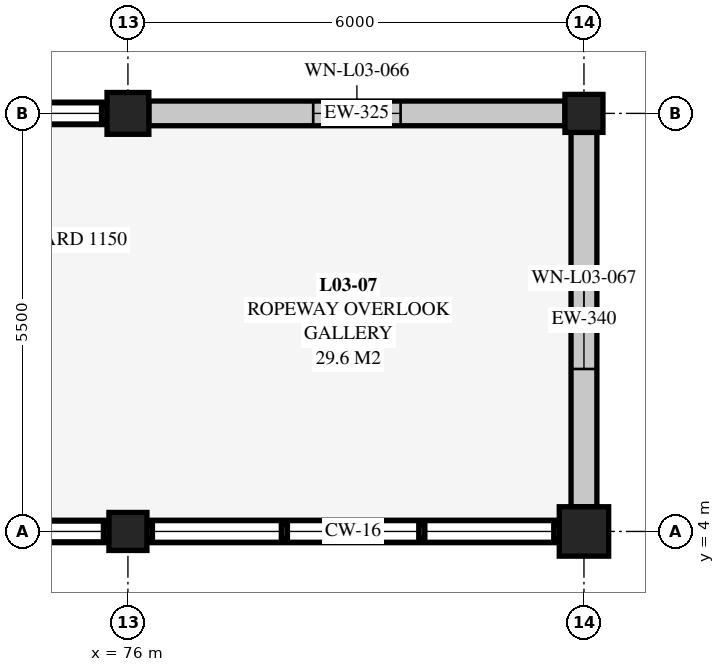
"""IFC4 building model, lengths in metres.
Left out: names, types, materials, properties, quantities, classifications, styles, units other than length and angle.
Written with IfcOpenShell. Run it as: python <this file> out.ifc"""

import sys

from ifc_helpers import new_model, si_unit, direction, frame, frame_2d, origin, origin_2d, place, context, subcontext, project, spatial, rectangle, extrude, element, fill, save


model = new_model("IFC4")
c1 = context("Model", 3, precision=1e-05, world=origin(), true_north=direction((0.0, 1.0)))
c2 = subcontext(c1, "Body", "Model", "MODEL_VIEW")
j1 = project(units=[si_unit("LENGTHUNIT", "METRE"), si_unit("PLANEANGLEUNIT", "RADIAN")], contexts=[c1])
p1 = place(None, origin())
s1 = spatial("IfcSite", under=j1, at=p1, CompositionType="ELEMENT")
p2 = place(p1, origin())
s2 = spatial("IfcBuilding", under=s1, at=p2, CompositionType="ELEMENT")
p3 = place(p2, frame((0.0, 0.0, 9.0)))
s3 = spatial("IfcBuildingStorey", under=s2, at=p3, CompositionType="ELEMENT", Elevation=9.0)
p4 = place(p3, frame((76.0, 4.0, 0.0), z_axis=(0.0, 0.0, 1.0), x_axis=(1.0, 0.0, 0.0)))
e1 = element("IfcColumn", 1, at=p4, inside=s3, PredefinedType="COLUMN", context=c2, shape_type="SweptSolid", body=[
    extrude(rectangle(XDim=0.5, YDim=0.5, at=origin_2d()), origin(), (0.0, 0.0, 1.0), 4.5),
])
p5 = place(p3, frame((76.0, 9.5, 0.0), z_axis=(0.0, 0.0, 1.0), x_axis=(1.0, 0.0, 0.0)))
e2 = element("IfcColumn", 2, at=p5, inside=s3, PredefinedType="COLUMN", context=c2, shape_type="SweptSolid", body=[
    extrude(rectangle(XDim=0.55, YDim=0.55, at=origin_2d()), origin(), (0.0, 0.0, 1.0), 4.5),
])
p6 = place(p3, frame((82.0, 4.0, 0.0), z_axis=(0.0, 0.0, 1.0), x_axis=(1.0, 0.0, 0.0)))
e3 = element("IfcColumn", 3, at=p6, inside=s3, PredefinedType="COLUMN", context=c2, shape_type="SweptSolid", body=[
    extrude(rectangle(XDim=0.65, YDim=0.65, at=origin_2d()), origin(), (0.0, 0.0, 1.0), 4.5),
])
p7 = place(p3, frame((82.0, 9.5, 0.0), z_axis=(0.0, 0.0, 1.0), x_axis=(1.0, 0.0, 0.0)))
e4 = element("IfcColumn", 4, at=p7, inside=s3, PredefinedType="COLUMN", context=c2, shape_type="SweptSolid", body=[
    extrude(rectangle(XDim=0.5, YDim=0.5, at=origin_2d()), origin(), (0.0, 0.0, 1.0), 4.5),
])
p8 = place(p3, frame((75.75, 4.0, 0.0), z_axis=(0.0, 0.0, 1.0), x_axis=(-1.0, 0.0, 0.0)))
e5 = element("IfcWall", 5, at=p8, inside=s3, PredefinedType="SOLIDWALL", context=c2, shape_type="SweptSolid", body=[
    extrude(rectangle(XDim=5.45, YDim=0.295, at=frame_2d((2.725, 0.0))), origin(), (0.0, 0.0, 1.0), 0.41),
])
p9 = place(p3, frame((70.325, 9.5, 0.0), z_axis=(0.0, 0.0, 1.0), x_axis=(1.0, 0.0, 0.0)))
e6 = element("IfcWall", 6, at=p9, inside=s3, PredefinedType="SOLIDWALL", context=c2, shape_type="SweptSolid", body=[
    extrude(rectangle(XDim=5.4, YDim=0.295, at=frame_2d((2.7, 0.0))), origin(), (0.0, 0.0, 1.0), 0.46),
])
p10 = place(p3, frame((81.675, 4.0, 0.0), z_axis=(0.0, 0.0, 1.0), x_axis=(-1.0, 0.0, 0.0)))
e7 = element("IfcWall", 7, at=p10, inside=s3, PredefinedType="SOLIDWALL", context=c2, shape_type="SweptSolid", body=[
    extrude(rectangle(XDim=5.425, YDim=0.295, at=frame_2d((2.712, 0.0))), origin(), (0.0, 0.0, 1.0), 0.52),
])
p11 = place(p3, frame((76.275, 9.5, 0.0), z_axis=(0.0, 0.0, 1.0), x_axis=(1.0, 0.0, 0.0)))
e8 = element("IfcWall", 8, at=p11, inside=s3, PredefinedType="SOLIDWALL", context=c2, shape_type="SweptSolid", body=[
    extrude(rectangle(XDim=5.475, YDim=0.325, at=frame_2d((2.738, 0.0))), origin(), (0.0, 0.0, 1.0), 4.093),
])
p12 = place(p11, frame((2.163, 0.0, 1.35)))
e9 = element("IfcOpeningElement", 9, at=p12, cuts=e8, PredefinedType="OPENING", context=c2, shape_type="SweptSolid", body=[
    extrude(rectangle(XDim=1.15, YDim=1.35, at=frame_2d((0.575, 0.675))), frame((0.0, 0.173, 0.0), z_axis=(0.0, -1.0, 0.0), x_axis=(1.0, 0.0, 0.0)), (0.0, 0.0, 1.0), 0.345),
])
p13 = place(p3, frame((82.0, 9.25, 0.0), z_axis=(0.0, 0.0, 1.0), x_axis=(0.0, -1.0, 0.0)))
e10 = element("IfcWall", 10, at=p13, inside=s3, PredefinedType="SOLIDWALL", context=c2, shape_type="SweptSolid", body=[
    extrude(rectangle(XDim=4.925, YDim=0.34, at=frame_2d((2.462, 0.0))), origin(), (0.0, 0.0, 1.0), 4.093),
])
p14 = place(p13, frame((1.812, 0.0, 1.3)))
e11 = element("IfcOpeningElement", 11, at=p14, cuts=e10, PredefinedType="OPENING", context=c2, shape_type="SweptSolid", body=[
    extrude(rectangle(XDim=1.3, YDim=1.45, at=frame_2d((0.65, 0.725))), frame((0.0, 0.18, 0.0), z_axis=(0.0, -1.0, 0.0), x_axis=(1.0, 0.0, 0.0)), (0.0, 0.0, 1.0), 0.36),
])
p15 = place(p12, origin())
e12 = element("IfcWindow", 12, at=p15, inside=s3, PartitioningType="SINGLE_PANEL", PredefinedType="WINDOW", context=c2, shape_type="SweptSolid", body=[
    extrude(rectangle(XDim=1.15, YDim=1.35, at=frame_2d((0.575, 0.675))), frame((0.0, 0.03, 0.0), z_axis=(0.0, -1.0, 0.0), x_axis=(1.0, 0.0, 0.0)), (0.0, 0.0, 1.0), 0.06),
])
fill(e9, e12)
p16 = place(p14, origin())
e13 = element("IfcWindow", 13, at=p16, inside=s3, PartitioningType="SINGLE_PANEL", PredefinedType="WINDOW", context=c2, shape_type="SweptSolid", body=[
    extrude(rectangle(XDim=1.3, YDim=1.45, at=frame_2d((0.65, 0.725))), frame((0.0, 0.03, 0.0), z_axis=(0.0, -1.0, 0.0), x_axis=(1.0, 0.0, 0.0)), (0.0, 0.0, 1.0), 0.06),
])
fill(e11, e13)
save(model, sys.argv[1])
